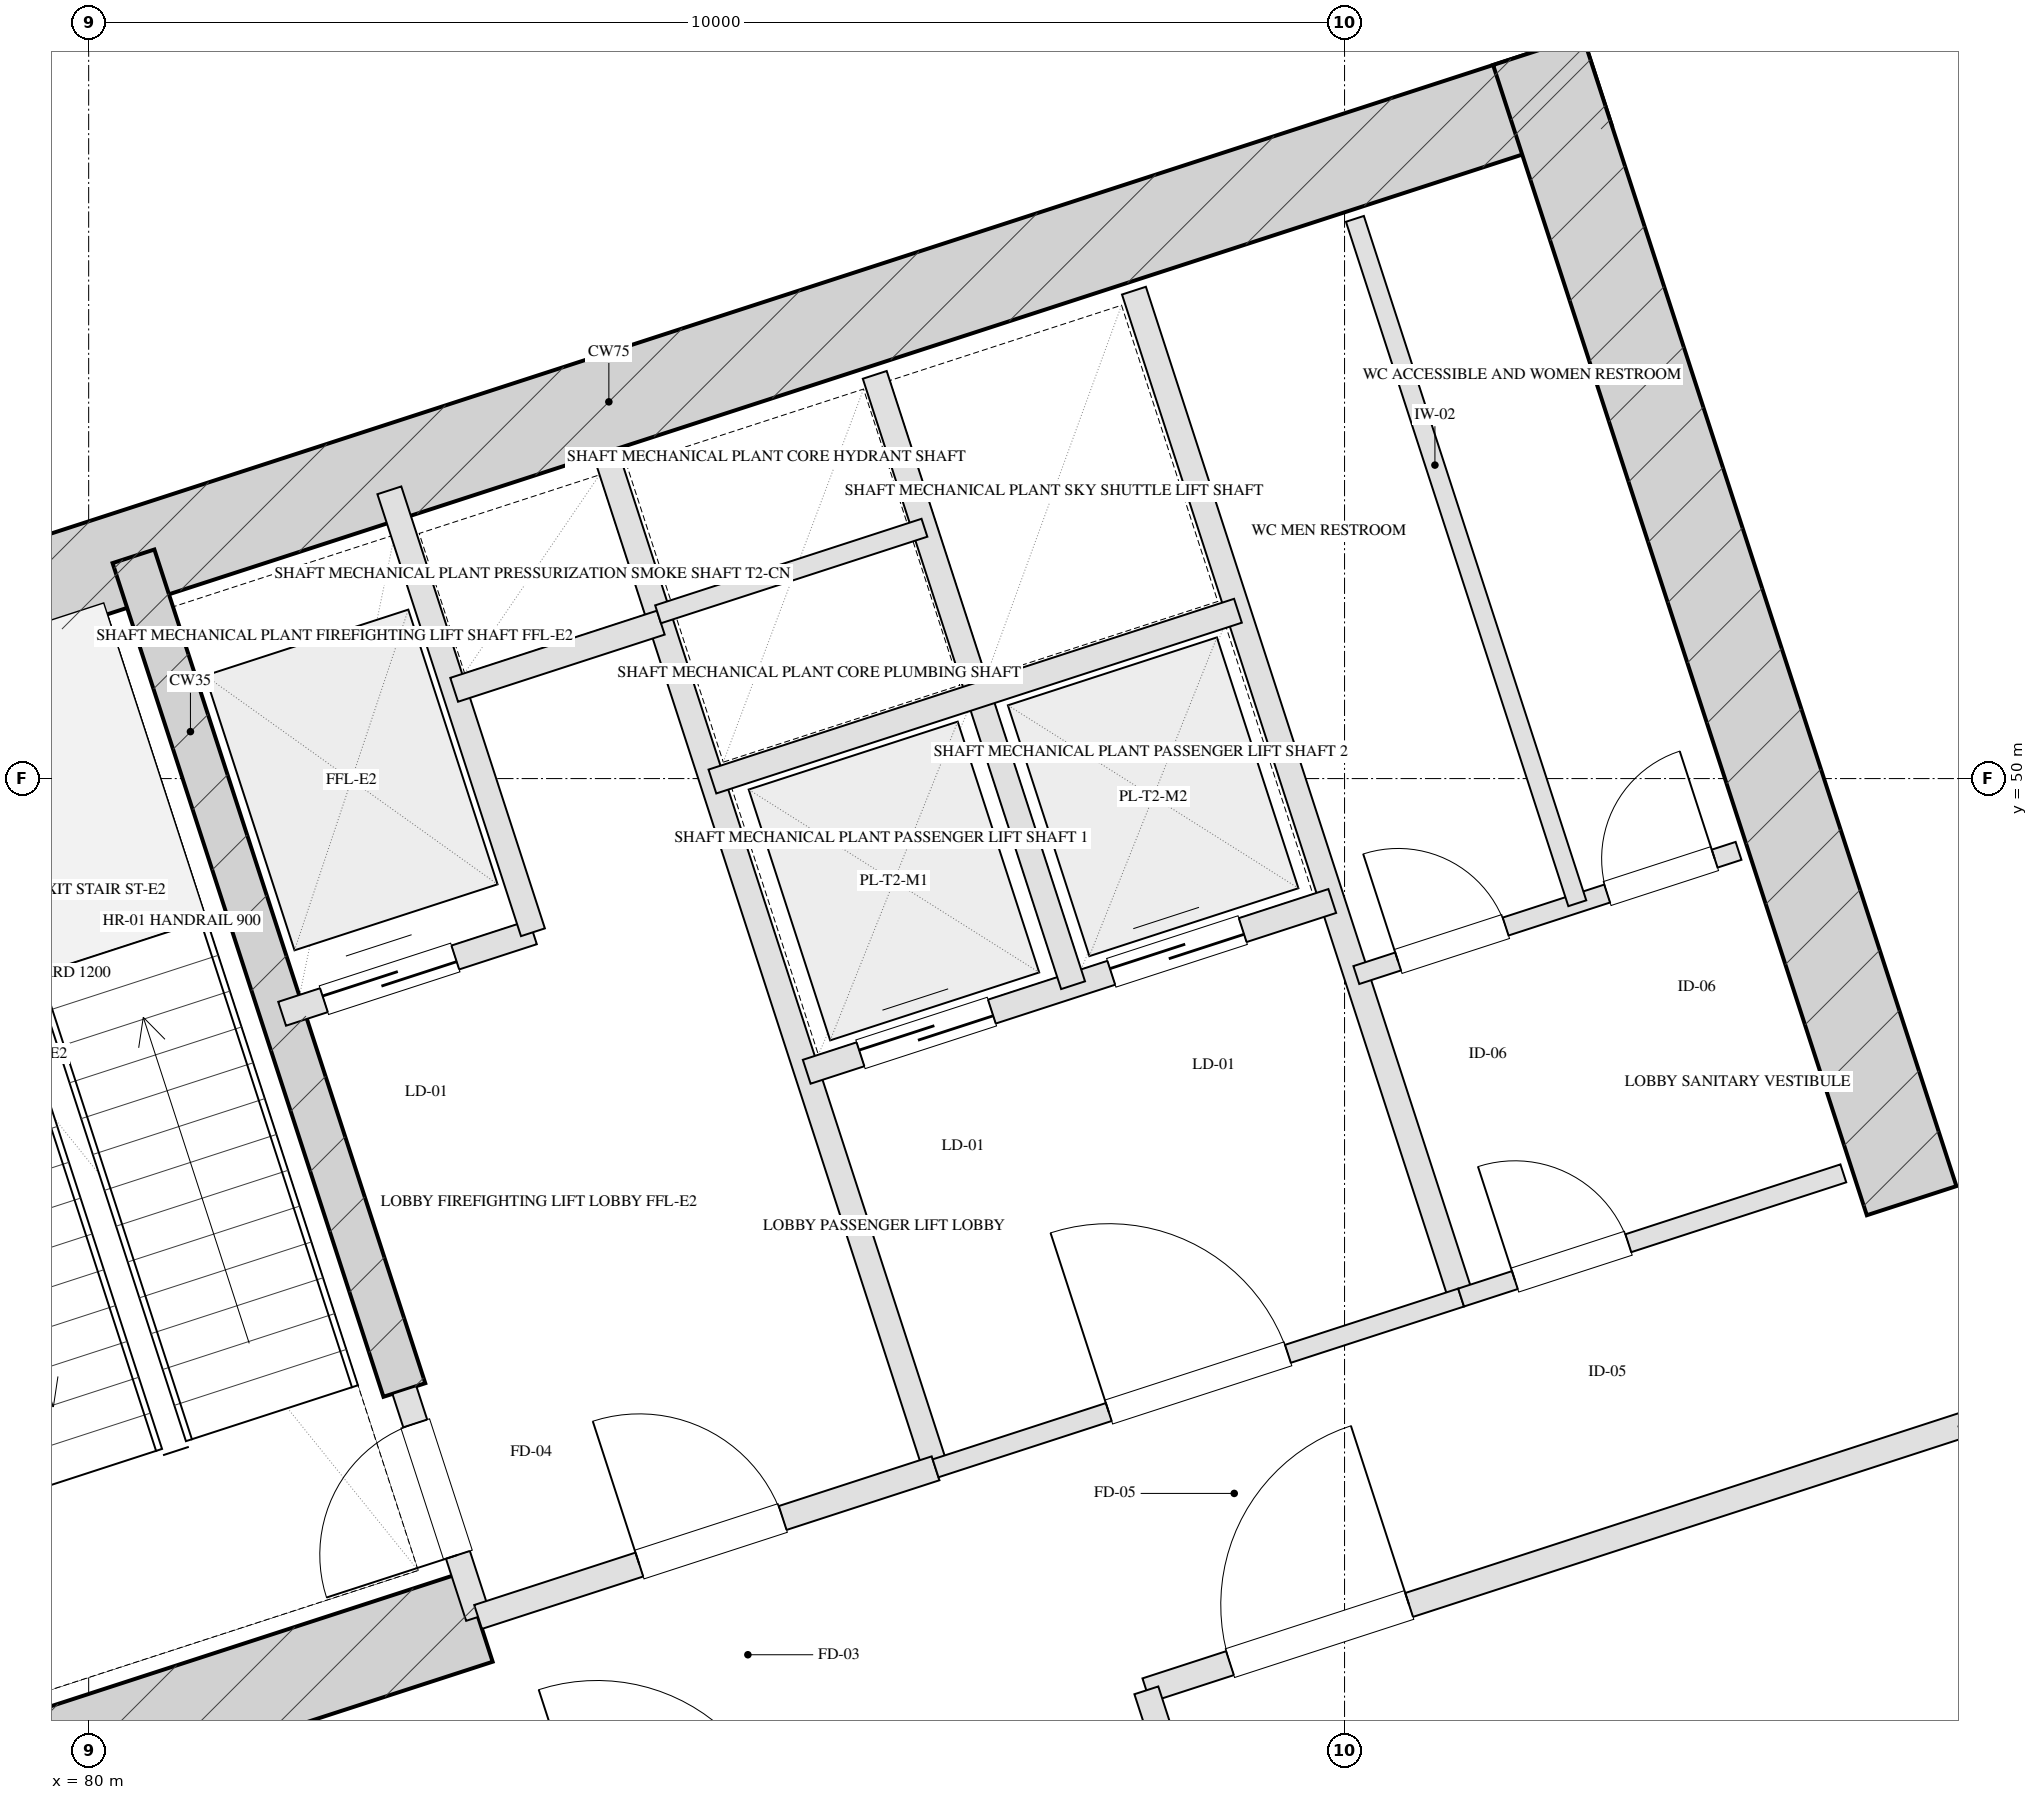
"""IFC4 building model, lengths in metres.
Left out: names, types, materials, properties, quantities, classifications, styles, units other than length and angle.
Written with IfcOpenShell. Run it as: python <this file> out.ifc"""

import sys

from ifc_helpers import new_model, si_unit, direction, frame, frame_2d, origin, place, context, subcontext, project, spatial, rectangle, extrude, element, fill, save


model = new_model("IFC4")
c1 = context("Model", 3, precision=1e-05, world=origin(), true_north=direction((0.0, 1.0)))
c2 = subcontext(c1, "Body", "Model", "MODEL_VIEW")
j1 = project(units=[si_unit("LENGTHUNIT", "METRE"), si_unit("PLANEANGLEUNIT", "RADIAN")], contexts=[c1])
p1 = place(None, origin())
s1 = spatial("IfcSite", under=j1, at=p1, CompositionType="ELEMENT")
p2 = place(p1, origin())
s2 = spatial("IfcBuilding", under=s1, at=p2, CompositionType="ELEMENT")
p3 = place(p2, frame((0.0, 0.0, 92.0)))
s3 = spatial("IfcBuildingStorey", under=s2, at=p3, CompositionType="ELEMENT", Elevation=92.0)
p4 = place(p3, frame((76.272, 50.443, 0.0), z_axis=(0.0, 0.0, 1.0), x_axis=(0.951056072937, 0.309018358888, 0.0)))
e1 = element("IfcWall", 1, at=p4, inside=s3, PredefinedType="SHEAR", context=c2, shape_type="SweptSolid", body=[
    extrude(rectangle(XDim=16.55, YDim=0.75, at=frame_2d((8.275, 0.0))), origin(), (0.0, 0.0, 1.0), 4.6),
])
for number, where, z_axis, x_axis in (
    (2, (79.489, 41.756, 0.0), (0.0, 0.0, 1.0), (-0.309, 0.951, 0.0)),
    (3, (94.515, 46.639, 0.0), (0.0, 0.0, 1.0), (-0.309, 0.951, 0.0)),
):
    element("IfcWall", number, at=place(p3, frame(where, z_axis=z_axis, x_axis=x_axis)), inside=s3, PredefinedType="SHEAR", context=c2, shape_type="SweptSolid", body=[
        extrude(rectangle(XDim=9.63, YDim=0.75, at=frame_2d((4.815, 0.0))), origin(), (0.0, 0.0, 1.0), 4.6),
    ])
p5 = place(p3, frame((82.514, 45.131, 0.0), z_axis=(0.0, 0.0, 1.0), x_axis=(-0.308988790936, 0.951065679686, 0.0)))
e4 = element("IfcWall", 4, at=p5, inside=s3, PredefinedType="SHEAR", context=c2, shape_type="SweptSolid", body=[
    extrude(rectangle(XDim=6.98, YDim=0.35, at=frame_2d((3.49, 0.0))), origin(), (0.0, 0.0, 1.0), 4.6),
])
p6 = place(p3, frame((79.016, 41.997, 0.0), z_axis=(0.0, 0.0, 1.0), x_axis=(0.95106038264, 0.309005094736, 0.0)))
e5 = element("IfcWall", 5, at=p6, inside=s3, PredefinedType="SHEAR", context=c2, shape_type="SweptSolid", body=[
    extrude(rectangle(XDim=4.295, YDim=0.75, at=frame_2d((2.147, 0.0))), origin(), (0.0, 0.0, 1.0), 4.6),
])
p7 = place(p3, frame((80.716, 6.59, 0.0), z_axis=(0.0, 0.0, 1.0), x_axis=(-0.309017542002, 0.95105633836, 0.0)))
e6 = element("IfcWall", 6, at=p7, inside=s3, PredefinedType="SOLIDWALL", context=c2, shape_type="SweptSolid", body=[
    extrude(rectangle(XDim=46.4, YDim=0.4, at=frame_2d((23.2, 0.0))), origin(), (0.0, 0.0, 1.0), 3.7),
])
p8 = place(p3, frame((68.047, 53.995, 0.0), z_axis=(0.0, 0.0, 1.0), x_axis=(0.95105505922, 0.309021478754, 0.0)))
e7 = element("IfcWall", 7, at=p8, inside=s3, PredefinedType="SOLIDWALL", context=c2, shape_type="SweptSolid", body=[
    extrude(rectangle(XDim=29.4, YDim=0.4, at=frame_2d((14.7, 0.0))), origin(), (0.0, 0.0, 1.0), 3.7),
])
p9 = place(p3, frame((83.101, 43.324, 0.0), z_axis=(0.0, 0.0, 1.0), x_axis=(-0.309048298632, 0.951046344356, 0.0)))
e8 = element("IfcWall", 8, at=p9, inside=s3, PredefinedType="PARTITIONING", context=c2, shape_type="SweptSolid", body=[
    extrude(rectangle(XDim=1.9, YDim=0.2, at=frame_2d((0.95, 0.0))), origin(), (0.0, 0.0, 1.0), 4.305),
])
p10 = place(p9, frame((0.52, 0.0, 0.0)))
e9 = element("IfcOpeningElement", 9, at=p10, cuts=e8, PredefinedType="OPENING", context=c2, shape_type="SweptSolid", body=[
    extrude(rectangle(XDim=1.1, YDim=2.05, at=frame_2d((0.55, 1.025))), frame((0.0, 0.11, 0.0), z_axis=(0.0, -1.0, 0.0), x_axis=(1.0, 0.0, 0.0)), (0.0, 0.0, 1.0), 0.22),
])
p11 = place(p3, frame((86.743, 44.508, 0.0), z_axis=(0.0, 0.0, 1.0), x_axis=(-0.309016001439, 0.951056838919, 0.0)))
e10 = element("IfcWall", 10, at=p11, inside=s3, PredefinedType="PARTITIONING", context=c2, shape_type="SweptSolid", body=[
    extrude(rectangle(XDim=8.43, YDim=0.2, at=frame_2d((4.215, 0.0))), origin(), (0.0, 0.0, 1.0), 4.305),
])
p12 = place(p3, frame((83.101, 43.324, 0.0), z_axis=(0.0, 0.0, 1.0), x_axis=(0.951052804469, 0.309028417967, 0.0)))
e11 = element("IfcWall", 11, at=p12, inside=s3, PredefinedType="PARTITIONING", context=c2, shape_type="SweptSolid", body=[
    extrude(rectangle(XDim=3.83, YDim=0.2, at=frame_2d((1.915, 0.0))), origin(), (0.0, 0.0, 1.0), 4.305),
])
p13 = place(p12, frame((1.35, 0.0, 0.0)))
e12 = element("IfcOpeningElement", 12, at=p13, cuts=e11, PredefinedType="OPENING", context=c2, shape_type="SweptSolid", body=[
    extrude(rectangle(XDim=1.2, YDim=2.05, at=frame_2d((0.6, 1.025))), frame((0.0, 0.11, 0.0), z_axis=(0.0, -1.0, 0.0), x_axis=(1.0, 0.0, 0.0)), (0.0, 0.0, 1.0), 0.22),
])
p14 = place(p3, frame((81.54, 48.127, 0.0), z_axis=(0.0, 0.0, 1.0), x_axis=(0.951062257173, 0.308999325213, 0.0)))
e13 = element("IfcWall", 13, at=p14, inside=s3, PredefinedType="PARTITIONING", context=c2, shape_type="SweptSolid", body=[
    extrude(rectangle(XDim=2.1, YDim=0.2, at=frame_2d((1.05, 0.0))), origin(), (0.0, 0.0, 1.0), 4.305),
])
p15 = place(p14, frame((0.35, 0.0, 0.0)))
e14 = element("IfcOpeningElement", 14, at=p15, cuts=e13, PredefinedType="OPENING", context=c2, shape_type="SweptSolid", body=[
    extrude(rectangle(XDim=1.1, YDim=2.05, at=frame_2d((0.55, 1.025))), frame((0.0, 0.11, 0.0), z_axis=(0.0, -1.0, 0.0), x_axis=(1.0, 0.0, 0.0)), (0.0, 0.0, 1.0), 0.22),
])
p16 = place(p3, frame((83.538, 48.776, 0.0), z_axis=(0.0, 0.0, 1.0), x_axis=(-0.3089935693, 0.951064127245, 0.0)))
e15 = element("IfcWall", 15, at=p16, inside=s3, PredefinedType="PARTITIONING", context=c2, shape_type="SweptSolid", body=[
    extrude(rectangle(XDim=3.7, YDim=0.2, at=frame_2d((1.85, 0.0))), origin(), (0.0, 0.0, 1.0), 4.305),
])
p17 = place(p3, frame((82.91, 50.707, 0.0), z_axis=(0.0, 0.0, 1.0), x_axis=(0.951041328149, 0.309063734775, 0.0)))
e16 = element("IfcWall", 16, at=p17, inside=s3, PredefinedType="PARTITIONING", context=c2, shape_type="SweptSolid", body=[
    extrude(rectangle(XDim=1.73, YDim=0.2, at=frame_2d((0.865, 0.0))), origin(), (0.0, 0.0, 1.0), 4.305),
])
p18 = place(p3, frame((90.928, 45.868, 0.0), z_axis=(0.0, 0.0, 1.0), x_axis=(-0.309042196757, 0.951048327176, 0.0)))
e17 = element("IfcWall", 17, at=p18, inside=s3, PredefinedType="PARTITIONING", context=c2, shape_type="SweptSolid", body=[
    extrude(rectangle(XDim=8.43, YDim=0.2, at=frame_2d((4.215, 0.0))), origin(), (0.0, 0.0, 1.0), 4.305),
])
p19 = place(p3, frame((86.743, 44.508, 0.0), z_axis=(0.0, 0.0, 1.0), x_axis=(0.951063829732, 0.308994485023, 0.0)))
e18 = element("IfcWall", 18, at=p19, inside=s3, PredefinedType="PARTITIONING", context=c2, shape_type="SweptSolid", body=[
    extrude(rectangle(XDim=4.4, YDim=0.15, at=frame_2d((2.2, 0.0))), origin(), (0.0, 0.0, 1.0), 4.305),
])
p20 = place(p19, frame((1.45, 0.0, 0.0)))
e19 = element("IfcOpeningElement", 19, at=p20, cuts=e18, PredefinedType="OPENING", context=c2, shape_type="SweptSolid", body=[
    extrude(rectangle(XDim=1.5, YDim=2.05, at=frame_2d((0.75, 1.025))), frame((0.0, 0.085, 0.0), z_axis=(0.0, -1.0, 0.0), x_axis=(1.0, 0.0, 0.0)), (0.0, 0.0, 1.0), 0.17),
])
p21 = place(p3, frame((85.718, 47.666, 0.0), z_axis=(0.0, 0.0, 1.0), x_axis=(0.951058531764, 0.30901079133, 0.0)))
e20 = element("IfcWall", 20, at=p21, inside=s3, PredefinedType="PARTITIONING", context=c2, shape_type="SweptSolid", body=[
    extrude(rectangle(XDim=4.4, YDim=0.2, at=frame_2d((2.2, 0.0))), origin(), (0.0, 0.0, 1.0), 4.305),
])
p22 = place(p21, frame((0.45, 0.0, 0.0)))
e21 = element("IfcOpeningElement", 21, at=p22, cuts=e20, PredefinedType="OPENING", context=c2, shape_type="SweptSolid", body=[
    extrude(rectangle(XDim=1.1, YDim=2.05, at=frame_2d((0.55, 1.025))), frame((0.0, 0.11, 0.0), z_axis=(0.0, -1.0, 0.0), x_axis=(1.0, 0.0, 0.0)), (0.0, 0.0, 1.0), 0.22),
])
p23 = place(p21, frame((2.55, 0.0, 0.0)))
e22 = element("IfcOpeningElement", 22, at=p23, cuts=e20, PredefinedType="OPENING", context=c2, shape_type="SweptSolid", body=[
    extrude(rectangle(XDim=1.1, YDim=2.05, at=frame_2d((0.55, 1.025))), frame((0.0, 0.11, 0.0), z_axis=(0.0, -1.0, 0.0), x_axis=(1.0, 0.0, 0.0)), (0.0, 0.0, 1.0), 0.22),
])
p24 = place(p3, frame((87.838, 48.354, 0.0), z_axis=(0.0, 0.0, 1.0), x_axis=(-0.3090093719, 0.951058992953, 0.0)))
e23 = element("IfcWall", 23, at=p24, inside=s3, PredefinedType="PARTITIONING", context=c2, shape_type="SweptSolid", body=[
    extrude(rectangle(XDim=5.11, YDim=0.2, at=frame_2d((2.555, 0.0))), origin(), (0.0, 0.0, 1.0), 4.305),
])
p25 = place(p3, frame((84.967, 49.977, 0.0), z_axis=(0.0, 0.0, 1.0), x_axis=(0.951063829732, 0.308994485023, 0.0)))
e24 = element("IfcWall", 24, at=p25, inside=s3, PredefinedType="PARTITIONING", context=c2, shape_type="SweptSolid", body=[
    extrude(rectangle(XDim=4.4, YDim=0.2, at=frame_2d((2.2, 0.0))), origin(), (0.0, 0.0, 1.0), 4.305),
])
p26 = place(p3, frame((84.534, 51.308, 0.0), z_axis=(0.0, 0.0, 1.0), x_axis=(0.951075093106, 0.308959814982, 0.0)))
e25 = element("IfcWall", 25, at=p26, inside=s3, PredefinedType="PARTITIONING", context=c2, shape_type="SweptSolid", body=[
    extrude(rectangle(XDim=2.23, YDim=0.15, at=frame_2d((1.115, 0.0))), origin(), (0.0, 0.0, 1.0), 4.305),
])
p27 = place(p3, frame((90.928, 45.868, 0.0), z_axis=(0.0, 0.0, 1.0), x_axis=(0.951059297078, 0.309008435874, 0.0)))
e26 = element("IfcWall", 26, at=p27, inside=s3, PredefinedType="PARTITIONING", context=c2, shape_type="SweptSolid", body=[
    extrude(rectangle(XDim=3.2, YDim=0.15, at=frame_2d((1.6, 0.0))), origin(), (0.0, 0.0, 1.0), 4.305),
])
p28 = place(p27, frame((0.45, 0.0, 0.0)))
e27 = element("IfcOpeningElement", 27, at=p28, cuts=e26, PredefinedType="OPENING", context=c2, shape_type="SweptSolid", body=[
    extrude(rectangle(XDim=0.95, YDim=2.05, at=frame_2d((0.475, 1.025))), frame((0.0, 0.085, 0.0), z_axis=(0.0, -1.0, 0.0), x_axis=(1.0, 0.0, 0.0)), (0.0, 0.0, 1.0), 0.17),
])
p29 = place(p3, frame((90.094, 48.436, 0.0), z_axis=(0.0, 0.0, 1.0), x_axis=(0.951066581729, 0.308986014439, 0.0)))
e28 = element("IfcWall", 28, at=p29, inside=s3, PredefinedType="PARTITIONING", context=c2, shape_type="SweptSolid", body=[
    extrude(rectangle(XDim=3.2, YDim=0.15, at=frame_2d((1.6, 0.0))), origin(), (0.0, 0.0, 1.0), 4.305),
])
p30 = place(p29, frame((0.35, 0.0, 0.0)))
e29 = element("IfcOpeningElement", 29, at=p30, cuts=e28, PredefinedType="OPENING", context=c2, shape_type="SweptSolid", body=[
    extrude(rectangle(XDim=0.9, YDim=2.05, at=frame_2d((0.45, 1.025))), frame((0.0, 0.085, 0.0), z_axis=(0.0, -1.0, 0.0), x_axis=(1.0, 0.0, 0.0)), (0.0, 0.0, 1.0), 0.17),
])
p31 = place(p29, frame((2.1, 0.0, 0.0)))
e30 = element("IfcOpeningElement", 30, at=p31, cuts=e28, PredefinedType="OPENING", context=c2, shape_type="SweptSolid", body=[
    extrude(rectangle(XDim=0.9, YDim=2.05, at=frame_2d((0.45, 1.025))), frame((0.0, 0.085, 0.0), z_axis=(0.0, -1.0, 0.0), x_axis=(1.0, 0.0, 0.0)), (0.0, 0.0, 1.0), 0.17),
])
p32 = place(p3, frame((91.853, 49.007, 0.0), z_axis=(0.0, 0.0, 1.0), x_axis=(-0.309022487551, 0.951054731437, 0.0)))
e31 = element("IfcWall", 31, at=p32, inside=s3, PredefinedType="PARTITIONING", context=c2, shape_type="SweptSolid", body=[
    extrude(rectangle(XDim=5.73, YDim=0.15, at=frame_2d((2.865, 0.0))), origin(), (0.0, 0.0, 1.0), 4.305),
])
p33 = place(p3, frame((88.422, 42.74, 0.0), z_axis=(0.0, 0.0, 1.0), x_axis=(0.951057423626, 0.309014201884, 0.0)))
e32 = element("IfcWall", 32, at=p33, inside=s3, PredefinedType="PARTITIONING", context=c2, shape_type="SweptSolid", body=[
    extrude(rectangle(XDim=15.9, YDim=0.2, at=frame_2d((7.95, 0.0))), origin(), (0.0, 0.0, 1.0), 3.515),
])
p34 = place(p33, frame((0.7, 0.0, 0.0)))
e33 = element("IfcOpeningElement", 33, at=p34, cuts=e32, PredefinedType="OPENING", context=c2, shape_type="SweptSolid", body=[
    extrude(rectangle(XDim=1.5, YDim=2.05, at=frame_2d((0.75, 1.025))), frame((0.0, 0.11, 0.0), z_axis=(0.0, -1.0, 0.0), x_axis=(1.0, 0.0, 0.0)), (0.0, 0.0, 1.0), 0.22),
])
p35 = place(p3, frame((93.861, 26.001, 0.0), z_axis=(0.0, 0.0, 1.0), x_axis=(-0.30901518495, 0.951057104211, 0.0)))
e34 = element("IfcWall", 34, at=p35, inside=s3, PredefinedType="PARTITIONING", context=c2, shape_type="SweptSolid", body=[
    extrude(rectangle(XDim=17.6, YDim=0.2, at=frame_2d((8.8, 0.0))), origin(), (0.0, 0.0, 1.0), 4.305),
])
p36 = place(p35, frame((8.2, 0.0, 0.0)))
e35 = element("IfcOpeningElement", 35, at=p36, cuts=e34, PredefinedType="OPENING", context=c2, shape_type="SweptSolid", body=[
    extrude(rectangle(XDim=1.2, YDim=2.05, at=frame_2d((0.6, 1.025))), frame((0.0, 0.11, 0.0), z_axis=(0.0, -1.0, 0.0), x_axis=(1.0, 0.0, 0.0)), (0.0, 0.0, 1.0), 0.22),
])
p37 = place(p10, origin())
e36 = element("IfcDoor", 36, at=p37, inside=s3, OperationType="SINGLE_SWING_LEFT", PredefinedType="DOOR", context=c2, shape_type="SweptSolid", body=[
    extrude(rectangle(XDim=1.1, YDim=2.05, at=frame_2d((0.55, 1.025))), frame((0.0, 0.025, 0.0), z_axis=(0.0, -1.0, 0.0), x_axis=(1.0, 0.0, 0.0)), (0.0, 0.0, 1.0), 0.05),
])
fill(e9, e36)
p38 = place(p13, origin())
e37 = element("IfcDoor", 37, at=p38, inside=s3, OperationType="SINGLE_SWING_LEFT", PredefinedType="DOOR", context=c2, shape_type="SweptSolid", body=[
    extrude(rectangle(XDim=1.2, YDim=2.05, at=frame_2d((0.6, 1.025))), frame((0.0, 0.025, 0.0), z_axis=(0.0, -1.0, 0.0), x_axis=(1.0, 0.0, 0.0)), (0.0, 0.0, 1.0), 0.05),
])
fill(e12, e37)
p39 = place(p15, origin())
e38 = element("IfcDoor", 38, at=p39, inside=s3, OperationType="DOUBLE_DOOR_SLIDING", PredefinedType="DOOR", context=c2, shape_type="SweptSolid", body=[
    extrude(rectangle(XDim=1.1, YDim=2.05, at=frame_2d((0.55, 1.025))), frame((0.0, 0.025, 0.0), z_axis=(0.0, -1.0, 0.0), x_axis=(1.0, 0.0, 0.0)), (0.0, 0.0, 1.0), 0.05),
])
fill(e14, e38)
p40 = place(p20, origin())
e39 = element("IfcDoor", 39, at=p40, inside=s3, OperationType="SINGLE_SWING_LEFT", PredefinedType="DOOR", context=c2, shape_type="SweptSolid", body=[
    extrude(rectangle(XDim=1.5, YDim=2.05, at=frame_2d((0.75, 1.025))), frame((0.0, 0.025, 0.0), z_axis=(0.0, -1.0, 0.0), x_axis=(1.0, 0.0, 0.0)), (0.0, 0.0, 1.0), 0.05),
])
fill(e19, e39)
p41 = place(p22, origin())
e40 = element("IfcDoor", 40, at=p41, inside=s3, OperationType="DOUBLE_DOOR_SLIDING", PredefinedType="DOOR", context=c2, shape_type="SweptSolid", body=[
    extrude(rectangle(XDim=1.1, YDim=2.05, at=frame_2d((0.55, 1.025))), frame((0.0, 0.025, 0.0), z_axis=(0.0, -1.0, 0.0), x_axis=(1.0, 0.0, 0.0)), (0.0, 0.0, 1.0), 0.05),
])
fill(e21, e40)
p42 = place(p23, origin())
e41 = element("IfcDoor", 41, at=p42, inside=s3, OperationType="DOUBLE_DOOR_SLIDING", PredefinedType="DOOR", context=c2, shape_type="SweptSolid", body=[
    extrude(rectangle(XDim=1.1, YDim=2.05, at=frame_2d((0.55, 1.025))), frame((0.0, 0.025, 0.0), z_axis=(0.0, -1.0, 0.0), x_axis=(1.0, 0.0, 0.0)), (0.0, 0.0, 1.0), 0.05),
])
fill(e22, e41)
p43 = place(p28, origin())
e42 = element("IfcDoor", 42, at=p43, inside=s3, OperationType="SINGLE_SWING_LEFT", PredefinedType="DOOR", context=c2, shape_type="SweptSolid", body=[
    extrude(rectangle(XDim=0.95, YDim=2.05, at=frame_2d((0.475, 1.025))), frame((0.0, 0.025, 0.0), z_axis=(0.0, -1.0, 0.0), x_axis=(1.0, 0.0, 0.0)), (0.0, 0.0, 1.0), 0.05),
])
fill(e27, e42)
p44 = place(p30, origin())
e43 = element("IfcDoor", 43, at=p44, inside=s3, OperationType="SINGLE_SWING_LEFT", PredefinedType="DOOR", context=c2, shape_type="SweptSolid", body=[
    extrude(rectangle(XDim=0.9, YDim=2.05, at=frame_2d((0.45, 1.025))), frame((0.0, 0.025, 0.0), z_axis=(0.0, -1.0, 0.0), x_axis=(1.0, 0.0, 0.0)), (0.0, 0.0, 1.0), 0.05),
])
fill(e29, e43)
p45 = place(p31, origin())
e44 = element("IfcDoor", 44, at=p45, inside=s3, OperationType="SINGLE_SWING_RIGHT", PredefinedType="DOOR", context=c2, shape_type="SweptSolid", body=[
    extrude(rectangle(XDim=0.9, YDim=2.05, at=frame_2d((0.45, 1.025))), frame((0.0, 0.025, 0.0), z_axis=(0.0, -1.0, 0.0), x_axis=(1.0, 0.0, 0.0)), (0.0, 0.0, 1.0), 0.05),
])
fill(e30, e44)
p46 = place(p34, origin())
e45 = element("IfcDoor", 45, at=p46, inside=s3, OperationType="SINGLE_SWING_RIGHT", PredefinedType="DOOR", context=c2, shape_type="SweptSolid", body=[
    extrude(rectangle(XDim=1.5, YDim=2.05, at=frame_2d((0.75, 1.025))), frame((0.0, 0.025, 0.0), z_axis=(0.0, -1.0, 0.0), x_axis=(1.0, 0.0, 0.0)), (0.0, 0.0, 1.0), 0.05),
])
fill(e33, e45)
save(model, sys.argv[1])
